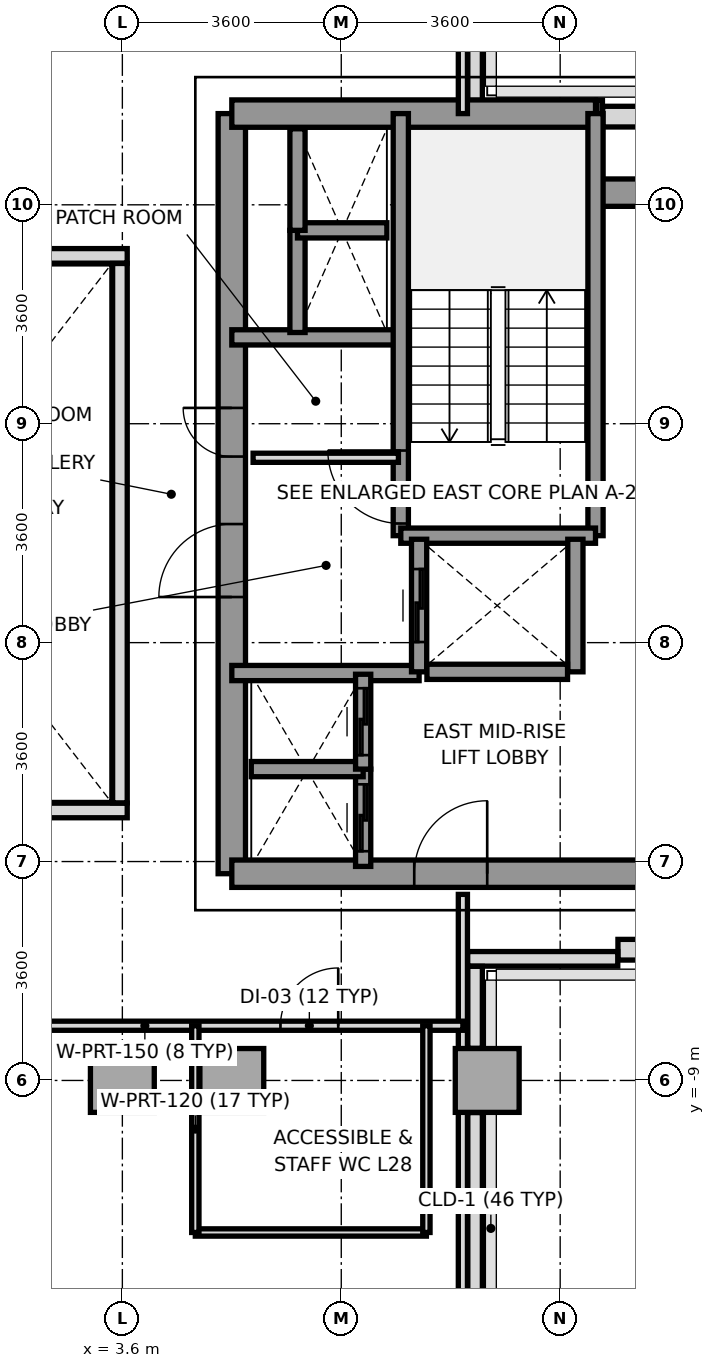
"""IFC4 building model, lengths in metres.
Left out: names, types, materials, properties, quantities, classifications, styles, units other than length and angle.
Written with IfcOpenShell. Run it as: python <this file> out.ifc"""

import sys

from ifc_helpers import new_model, si_unit, direction, frame, frame_2d, origin, origin_2d, place, context, subcontext, project, spatial, rectangle, extrude, source, transform, mapped, element, fill, save


model = new_model("IFC4")
c1 = context("Model", 3, precision=1e-05, world=origin(), true_north=direction((0.0, 1.0)))
c2 = subcontext(c1, "Body", "Model", "MODEL_VIEW")
j1 = project(units=[si_unit("LENGTHUNIT", "METRE"), si_unit("PLANEANGLEUNIT", "RADIAN")], contexts=[c1])
p1 = place(None, origin())
s1 = spatial("IfcSite", under=j1, at=p1, CompositionType="ELEMENT")
p2 = place(p1, origin())
s2 = spatial("IfcBuilding", under=s1, at=p2, CompositionType="ELEMENT")
p3 = place(p2, frame((0.0, 0.0, 107.4)))
s3 = spatial("IfcBuildingStorey", under=s2, at=p3, CompositionType="ELEMENT", Elevation=107.4)
m1 = source(origin(), c2, "Body", "SweptSolid", [
    extrude(rectangle(XDim=1.05, YDim=1.05, at=origin_2d()), origin(), (0.0, 0.0, 1.0), 3.2),
])
for number, where, z_axis, x_axis in (
    (1, (3.6, -9.0, 0.0), (0.0, 0.0, 1.0), (1.0, 0.0, 0.0)),
    (2, (5.4, -9.0, 0.0), (0.0, 0.0, 1.0), (1.0, 0.0, 0.0)),
    (3, (9.6, -9.0, 0.0), (0.0, 0.0, 1.0), (1.0, 0.0, 0.0)),
):
    element("IfcColumn", number, at=place(p3, frame(where, z_axis=z_axis, x_axis=x_axis)), inside=s3, PredefinedType="COLUMN", context=c2, shape_type="MappedRepresentation", body=[
        mapped(m1, transform((0.0, 0.0, 0.0), x_axis=(1.0, 0.0, 0.0), y_axis=(0.0, 1.0, 0.0), z_axis=(0.0, 0.0, 1.0), scale=1.0)),
    ])
p4 = place(p3, frame((11.498, 6.85, 0.0), z_axis=(0.0, 0.0, 1.0), x_axis=(1.0, 0.0, 0.0)))
e4 = element("IfcWall", 4, at=p4, inside=s3, PredefinedType="SOLIDWALL", context=c2, shape_type="SweptSolid", body=[
    extrude(rectangle(XDim=2.585, YDim=0.34, at=frame_2d((1.292, 0.0))), origin(), (0.0, 0.0, 1.0), 3.2),
])
p5 = place(p3, frame((11.75, -6.85, 0.0), z_axis=(0.0, 0.0, 1.0), x_axis=(1.0, 0.0, 0.0)))
e5 = element("IfcWall", 5, at=p5, inside=s3, PredefinedType="SOLIDWALL", context=c2, shape_type="SweptSolid", body=[
    extrude(rectangle(XDim=2.333, YDim=0.34, at=frame_2d((1.167, 0.0))), origin(), (0.0, 0.0, 1.0), 3.2),
])
p6 = place(p3, frame((11.747, -7.0, 0.0), z_axis=(0.0, 0.0, 1.0), x_axis=(-1.0, 0.0, 0.0)))
e6 = element("IfcWall", 6, at=p6, inside=s3, PredefinedType="PARAPET", context=c2, shape_type="SweptSolid", body=[
    extrude(rectangle(XDim=2.469, YDim=0.24, at=frame_2d((1.234, 0.0))), origin(), (0.0, 0.0, 1.0), 1.15),
])
p7 = place(p3, frame((9.4, -7.123, 0.0), z_axis=(0.0, 0.0, 1.0), x_axis=(0.0, -1.0, 0.0)))
e7 = element("IfcWall", 7, at=p7, inside=s3, PredefinedType="PARAPET", context=c2, shape_type="SweptSolid", body=[
    extrude(rectangle(XDim=1.349, YDim=0.24, at=frame_2d((0.674, 0.0))), origin(), (0.0, 0.0, 1.0), 1.15),
])
p8 = place(p3, frame((9.4, -9.528, 0.0), z_axis=(0.0, 0.0, 1.0), x_axis=(0.0, -1.0, 0.0)))
e8 = element("IfcWall", 8, at=p8, inside=s3, PredefinedType="PARAPET", context=c2, shape_type="SweptSolid", body=[
    extrude(rectangle(XDim=6.075, YDim=0.24, at=frame_2d((3.037, 0.0))), origin(), (0.0, 0.0, 1.0), 1.15),
])
p9 = place(p3, frame((9.4, 8.472, 0.0), z_axis=(0.0, 0.0, 1.0), x_axis=(0.0, -1.0, 0.0)))
e9 = element("IfcWall", 9, at=p9, inside=s3, PredefinedType="PARAPET", context=c2, shape_type="SweptSolid", body=[
    extrude(rectangle(XDim=1.519, YDim=0.24, at=frame_2d((0.76, 0.0))), origin(), (0.0, 0.0, 1.0), 1.15),
])
p10 = place(p3, frame((11.403, 7.0, 0.0), z_axis=(0.0, 0.0, 1.0), x_axis=(1.0, 0.0, 0.0)))
e10 = element("IfcWall", 10, at=p10, inside=s3, PredefinedType="PARAPET", context=c2, shape_type="SweptSolid", body=[
    extrude(rectangle(XDim=0.092, YDim=0.24, at=frame_2d((0.046, 0.0))), origin(), (0.0, 0.0, 1.0), 1.15),
])
p11 = place(p3, frame((5.4, -5.6, 0.0), z_axis=(0.0, 0.0, 1.0), x_axis=(0.0, 1.0, 0.0)))
e11 = element("IfcWall", 11, at=p11, inside=s3, PredefinedType="SHEAR", context=c2, shape_type="SweptSolid", body=[
    extrude(rectangle(XDim=12.5, YDim=0.45, at=frame_2d((6.25, 0.0))), origin(), (0.0, 0.0, 1.0), 3.2),
])
p12 = place(p11, frame((4.55, 0.0, 0.0)))
e12 = element("IfcOpeningElement", 12, at=p12, cuts=e11, PredefinedType="OPENING", context=c2, shape_type="SweptSolid", body=[
    extrude(rectangle(XDim=1.2, YDim=2.2, at=frame_2d((0.6, 1.1))), frame((0.0, 0.235, 0.0), z_axis=(0.0, -1.0, 0.0), x_axis=(1.0, 0.0, 0.0)), (0.0, 0.0, 1.0), 0.47),
])
p13 = place(p11, frame((6.86, 0.0, 0.0)))
e13 = element("IfcOpeningElement", 13, at=p13, cuts=e11, PredefinedType="OPENING", context=c2, shape_type="SweptSolid", body=[
    extrude(rectangle(XDim=0.8, YDim=2.1, at=frame_2d((0.4, 1.05))), frame((0.0, 0.235, 0.0), z_axis=(0.0, -1.0, 0.0), x_axis=(1.0, 0.0, 0.0)), (0.0, 0.0, 1.0), 0.47),
])
p14 = place(p3, frame((5.4, 6.9, 0.0), z_axis=(0.0, 0.0, 1.0), x_axis=(1.0, 0.0, 0.0)))
e14 = element("IfcWall", 14, at=p14, inside=s3, PredefinedType="SHEAR", context=c2, shape_type="SweptSolid", body=[
    extrude(rectangle(XDim=5.981, YDim=0.45, at=frame_2d((2.991, 0.0))), origin(), (0.0, 0.0, 1.0), 3.2),
])
p15 = place(p3, frame((11.381, 5.6, 0.0), z_axis=(0.0, 0.0, 1.0), x_axis=(1.0, 0.0, 0.0)))
e15 = element("IfcWall", 15, at=p15, inside=s3, PredefinedType="SHEAR", context=c2, shape_type="SweptSolid", body=[
    extrude(rectangle(XDim=1.819, YDim=0.45, at=frame_2d((0.909, 0.0))), origin(), (0.0, 0.0, 1.0), 3.2),
])
p16 = place(p3, frame((5.4, -5.6, 0.0), z_axis=(0.0, 0.0, 1.0), x_axis=(1.0, 0.0, 0.0)))
e16 = element("IfcWall", 16, at=p16, inside=s3, PredefinedType="SHEAR", context=c2, shape_type="SweptSolid", body=[
    extrude(rectangle(XDim=7.8, YDim=0.45, at=frame_2d((3.9, 0.0))), origin(), (0.0, 0.0, 1.0), 3.2),
])
p17 = place(p16, frame((3.0, 0.0, 0.0)))
e17 = element("IfcOpeningElement", 17, at=p17, cuts=e16, PredefinedType="OPENING", context=c2, shape_type="SweptSolid", body=[
    extrude(rectangle(XDim=1.2, YDim=2.2, at=frame_2d((0.6, 1.1))), frame((0.0, 0.235, 0.0), z_axis=(0.0, -1.0, 0.0), x_axis=(1.0, 0.0, 0.0)), (0.0, 0.0, 1.0), 0.47),
])
p18 = place(p3, frame((5.4, 3.22, 0.0), z_axis=(0.0, 0.0, 1.0), x_axis=(1.0, 0.0, 0.0)))
e18 = element("IfcWall", 18, at=p18, inside=s3, PredefinedType="SOLIDWALL", context=c2, shape_type="SweptSolid", body=[
    extrude(rectangle(XDim=2.78, YDim=0.25, at=frame_2d((1.39, 0.0))), origin(), (0.0, 0.0, 1.0), 3.2),
])
p19 = place(p3, frame((5.4, -2.3, 0.0), z_axis=(0.0, 0.0, 1.0), x_axis=(1.0, 0.0, 0.0)))
e19 = element("IfcWall", 19, at=p19, inside=s3, PredefinedType="SOLIDWALL", context=c2, shape_type="SweptSolid", body=[
    extrude(rectangle(XDim=3.08, YDim=0.25, at=frame_2d((1.54, 0.0))), origin(), (0.0, 0.0, 1.0), 3.2),
])
p20 = place(p3, frame((8.179, -0.041, 0.0), z_axis=(0.0, 0.0, 1.0), x_axis=(0.0, 1.0, 0.0)))
e20 = element("IfcWall", 20, at=p20, inside=s3, PredefinedType="SOLIDWALL", context=c2, shape_type="SweptSolid", body=[
    extrude(rectangle(XDim=6.941, YDim=0.25, at=frame_2d((3.47, 0.0))), origin(), (0.0, 0.0, 1.0), 3.2),
])
p21 = place(p20, frame((0.2, 0.0, 0.0)))
e21 = element("IfcOpeningElement", 21, at=p21, cuts=e20, PredefinedType="OPENING", context=c2, shape_type="SweptSolid", body=[
    extrude(rectangle(XDim=1.2, YDim=2.2, at=frame_2d((0.6, 1.1))), frame((0.0, 0.135, 0.0), z_axis=(0.0, -1.0, 0.0), x_axis=(1.0, 0.0, 0.0)), (0.0, 0.0, 1.0), 0.27),
])
p22 = place(p3, frame((11.381, -0.041, 0.0), z_axis=(0.0, 0.0, 1.0), x_axis=(0.0, 1.0, 0.0)))
e22 = element("IfcWall", 22, at=p22, inside=s3, PredefinedType="SOLIDWALL", context=c2, shape_type="SweptSolid", body=[
    extrude(rectangle(XDim=6.941, YDim=0.25, at=frame_2d((3.47, 0.0))), origin(), (0.0, 0.0, 1.0), 3.2),
])
p23 = place(p3, frame((8.179, -0.041, 0.0), z_axis=(0.0, 0.0, 1.0), x_axis=(1.0, 0.0, 0.0)))
e23 = element("IfcWall", 23, at=p23, inside=s3, PredefinedType="SOLIDWALL", context=c2, shape_type="SweptSolid", body=[
    extrude(rectangle(XDim=3.202, YDim=0.25, at=frame_2d((1.601, 0.0))), origin(), (0.0, 0.0, 1.0), 3.2),
])
p24 = place(p3, frame((8.48, -2.28, 0.0), z_axis=(0.0, 0.0, 1.0), x_axis=(0.0, 1.0, 0.0)))
e24 = element("IfcWall", 24, at=p24, inside=s3, PredefinedType="SOLIDWALL", context=c2, shape_type="SweptSolid", body=[
    extrude(rectangle(XDim=2.18, YDim=0.25, at=frame_2d((1.09, 0.0))), origin(), (0.0, 0.0, 1.0), 3.2),
])
p25 = place(p24, frame((0.49, 0.0, 0.0)))
e25 = element("IfcOpeningElement", 25, at=p25, cuts=e24, PredefinedType="OPENING", context=c2, shape_type="SweptSolid", body=[
    extrude(rectangle(XDim=1.2, YDim=2.2, at=frame_2d((0.6, 1.1))), frame((0.0, 0.135, 0.0), z_axis=(0.0, -1.0, 0.0), x_axis=(1.0, 0.0, 0.0)), (0.0, 0.0, 1.0), 0.27),
])
p26 = place(p3, frame((11.05, -2.28, 0.0), z_axis=(0.0, 0.0, 1.0), x_axis=(0.0, 1.0, 0.0)))
e26 = element("IfcWall", 26, at=p26, inside=s3, PredefinedType="SOLIDWALL", context=c2, shape_type="SweptSolid", body=[
    extrude(rectangle(XDim=2.18, YDim=0.25, at=frame_2d((1.09, 0.0))), origin(), (0.0, 0.0, 1.0), 3.2),
])
p27 = place(p3, frame((8.609, -2.28, 0.0), z_axis=(0.0, 0.0, 1.0), x_axis=(1.0, 0.0, 0.0)))
e27 = element("IfcWall", 27, at=p27, inside=s3, PredefinedType="SOLIDWALL", context=c2, shape_type="SweptSolid", body=[
    extrude(rectangle(XDim=2.312, YDim=0.25, at=frame_2d((1.156, 0.0))), origin(), (0.0, 0.0, 1.0), 3.2),
])
p28 = place(p3, frame((7.56, -5.48, 0.0), z_axis=(0.0, 0.0, 1.0), x_axis=(0.0, 1.0, 0.0)))
e28 = element("IfcWall", 28, at=p28, inside=s3, PredefinedType="SOLIDWALL", context=c2, shape_type="SweptSolid", body=[
    extrude(rectangle(XDim=1.6, YDim=0.25, at=frame_2d((0.8, 0.0))), origin(), (0.0, 0.0, 1.0), 3.2),
])
p29 = place(p28, frame((0.25, 0.0, 0.0)))
e29 = element("IfcOpeningElement", 29, at=p29, cuts=e28, PredefinedType="OPENING", context=c2, shape_type="SweptSolid", body=[
    extrude(rectangle(XDim=1.1, YDim=2.2, at=frame_2d((0.55, 1.1))), frame((0.0, 0.135, 0.0), z_axis=(0.0, -1.0, 0.0), x_axis=(1.0, 0.0, 0.0)), (0.0, 0.0, 1.0), 0.27),
])
p30 = place(p3, frame((5.72, -3.88, 0.0), z_axis=(0.0, 0.0, 1.0), x_axis=(1.0, 0.0, 0.0)))
e30 = element("IfcWall", 30, at=p30, inside=s3, PredefinedType="SOLIDWALL", context=c2, shape_type="SweptSolid", body=[
    extrude(rectangle(XDim=1.84, YDim=0.25, at=frame_2d((0.92, 0.0))), origin(), (0.0, 0.0, 1.0), 3.2),
])
p31 = place(p3, frame((7.56, -3.88, 0.0), z_axis=(0.0, 0.0, 1.0), x_axis=(0.0, 1.0, 0.0)))
e31 = element("IfcWall", 31, at=p31, inside=s3, PredefinedType="SOLIDWALL", context=c2, shape_type="SweptSolid", body=[
    extrude(rectangle(XDim=1.56, YDim=0.25, at=frame_2d((0.78, 0.0))), origin(), (0.0, 0.0, 1.0), 3.2),
])
p32 = place(p31, frame((0.23, 0.0, 0.0)))
e32 = element("IfcOpeningElement", 32, at=p32, cuts=e31, PredefinedType="OPENING", context=c2, shape_type="SweptSolid", body=[
    extrude(rectangle(XDim=1.1, YDim=2.2, at=frame_2d((0.55, 1.1))), frame((0.0, 0.135, 0.0), z_axis=(0.0, -1.0, 0.0), x_axis=(1.0, 0.0, 0.0)), (0.0, 0.0, 1.0), 0.27),
])
p33 = place(p3, frame((6.48, 3.3, 0.0), z_axis=(0.0, 0.0, 1.0), x_axis=(0.0, 1.0, 0.0)))
e33 = element("IfcWall", 33, at=p33, inside=s3, PredefinedType="SOLIDWALL", context=c2, shape_type="SweptSolid", body=[
    extrude(rectangle(XDim=1.68, YDim=0.25, at=frame_2d((0.84, 0.0))), origin(), (0.0, 0.0, 1.0), 3.2),
])
p34 = place(p3, frame((6.48, 4.98, 0.0), z_axis=(0.0, 0.0, 1.0), x_axis=(1.0, 0.0, 0.0)))
e34 = element("IfcWall", 34, at=p34, inside=s3, PredefinedType="SOLIDWALL", context=c2, shape_type="SweptSolid", body=[
    extrude(rectangle(XDim=1.47, YDim=0.25, at=frame_2d((0.735, 0.0))), origin(), (0.0, 0.0, 1.0), 3.2),
])
p35 = place(p3, frame((6.48, 4.98, 0.0), z_axis=(0.0, 0.0, 1.0), x_axis=(0.0, 1.0, 0.0)))
e35 = element("IfcWall", 35, at=p35, inside=s3, PredefinedType="SOLIDWALL", context=c2, shape_type="SweptSolid", body=[
    extrude(rectangle(XDim=1.67, YDim=0.25, at=frame_2d((0.835, 0.0))), origin(), (0.0, 0.0, 1.0), 3.2),
])
p36 = place(p3, frame((5.75, 1.24, 0.0), z_axis=(0.0, 0.0, 1.0), x_axis=(1.0, 0.0, 0.0)))
e36 = element("IfcWall", 36, at=p36, inside=s3, PredefinedType="PARTITIONING", context=c2, shape_type="SweptSolid", body=[
    extrude(rectangle(XDim=2.39, YDim=0.15, at=frame_2d((1.195, 0.0))), origin(), (0.0, 0.0, 1.0), 2.3),
])
p37 = place(p3, frame((9.2, 6.9, 0.0), z_axis=(0.0, 0.0, 1.0), x_axis=(0.0, 1.0, 0.0)))
e37 = element("IfcWall", 37, at=p37, inside=s3, PredefinedType="PARTITIONING", context=c2, shape_type="SweptSolid", body=[
    extrude(rectangle(XDim=8.78, YDim=0.15, at=frame_2d((4.39, 0.0))), origin(), (0.0, 0.0, 1.0), 2.7),
])
p38 = place(p3, frame((9.2, -15.68, 0.0), z_axis=(0.0, 0.0, 1.0), x_axis=(0.0, 1.0, 0.0)))
e38 = element("IfcWall", 38, at=p38, inside=s3, PredefinedType="PARTITIONING", context=c2, shape_type="SweptSolid", body=[
    extrude(rectangle(XDim=9.74, YDim=0.15, at=frame_2d((4.87, 0.0))), origin(), (0.0, 0.0, 1.0), 2.7),
])
p39 = place(p3, frame((-1.26, -8.1, 0.0), z_axis=(0.0, 0.0, 1.0), x_axis=(1.0, 0.0, 0.0)))
e39 = element("IfcWall", 39, at=p39, inside=s3, PredefinedType="PARTITIONING", context=c2, shape_type="SweptSolid", body=[
    extrude(rectangle(XDim=10.46, YDim=0.15, at=frame_2d((5.23, 0.0))), origin(), (0.0, 0.0, 1.0), 2.75),
])
p40 = place(p39, frame((7.46, 0.0, 0.0)))
e40 = element("IfcOpeningElement", 40, at=p40, cuts=e39, PredefinedType="OPENING", context=c2, shape_type="SweptSolid", body=[
    extrude(rectangle(XDim=0.95, YDim=2.15, at=frame_2d((0.475, 1.075))), frame((0.0, 0.085, 0.0), z_axis=(0.0, -1.0, 0.0), x_axis=(1.0, 0.0, 0.0)), (0.0, 0.0, 1.0), 0.17),
])
p41 = place(p3, frame((4.8, -11.5, 0.0), z_axis=(0.0, 0.0, 1.0), x_axis=(1.0, 0.0, 0.0)))
e41 = element("IfcWall", 41, at=p41, inside=s3, PredefinedType="PARTITIONING", context=c2, shape_type="SweptSolid", body=[
    extrude(rectangle(XDim=3.8, YDim=0.12, at=frame_2d((1.9, 0.0))), origin(), (0.0, 0.0, 1.0), 3.2),
])
p42 = place(p3, frame((4.8, -11.5, 0.0), z_axis=(0.0, 0.0, 1.0), x_axis=(0.0, 1.0, 0.0)))
e42 = element("IfcWall", 42, at=p42, inside=s3, PredefinedType="PARTITIONING", context=c2, shape_type="SweptSolid", body=[
    extrude(rectangle(XDim=3.4, YDim=0.12, at=frame_2d((1.7, 0.0))), origin(), (0.0, 0.0, 1.0), 3.2),
])
p43 = place(p3, frame((8.6, -11.5, 0.0), z_axis=(0.0, 0.0, 1.0), x_axis=(0.0, 1.0, 0.0)))
e43 = element("IfcWall", 43, at=p43, inside=s3, PredefinedType="PARTITIONING", context=c2, shape_type="SweptSolid", body=[
    extrude(rectangle(XDim=3.4, YDim=0.12, at=frame_2d((1.7, 0.0))), origin(), (0.0, 0.0, 1.0), 2.7),
])
for number, where, z_axis, x_axis in (
    (44, (-3.68, -4.56, 0.0), (0.0, 0.0, 1.0), (1.0, 0.0, 0.0)),
    (45, (-3.68, 4.56, 0.0), (0.0, 0.0, 1.0), (1.0, 0.0, 0.0)),
):
    element("IfcWall", number, at=place(p3, frame(where, z_axis=z_axis, x_axis=x_axis)), inside=s3, PredefinedType="PARAPET", context=c2, shape_type="SweptSolid", body=[
        extrude(rectangle(XDim=7.36, YDim=0.24, at=frame_2d((3.68, 0.0))), origin(), (0.0, 0.0, 1.0), 1.15),
    ])
p44 = place(p3, frame((3.56, -4.435, 0.0), z_axis=(0.0, 0.0, 1.0), x_axis=(0.0, 1.0, 0.0)))
e46 = element("IfcWall", 46, at=p44, inside=s3, PredefinedType="PARAPET", context=c2, shape_type="SweptSolid", body=[
    extrude(rectangle(XDim=8.87, YDim=0.24, at=frame_2d((4.435, 0.0))), origin(), (0.0, 0.0, 1.0), 1.15),
])
m2 = source(origin(), c2, "Body", "SweptSolid", [
    extrude(rectangle(XDim=1.2, YDim=2.2, at=frame_2d((0.6, 1.1))), frame((0.0, 0.025, 0.0), z_axis=(0.0, -1.0, 0.0), x_axis=(1.0, 0.0, 0.0)), (0.0, 0.0, 1.0), 0.05),
])
p45 = place(p21, origin())
e47 = element("IfcDoor", 47, at=p45, inside=s3, OperationType="SINGLE_SWING_RIGHT", PredefinedType="DOOR", context=c2, shape_type="MappedRepresentation", body=[
    mapped(m2, transform((0.0, 0.0, 0.0), x_axis=(1.0, 0.0, 0.0), y_axis=(0.0, 1.0, 0.0), z_axis=(0.0, 0.0, 1.0), scale=1.0)),
])
fill(e21, e47)
p46 = place(p12, origin())
e48 = element("IfcDoor", 48, at=p46, inside=s3, OperationType="SINGLE_SWING_LEFT", PredefinedType="DOOR", context=c2, shape_type="MappedRepresentation", body=[
    mapped(m2, transform((0.0, 0.0, 0.0), x_axis=(1.0, 0.0, 0.0), y_axis=(0.0, 1.0, 0.0), z_axis=(0.0, 0.0, 1.0), scale=1.0)),
])
fill(e12, e48)
p47 = place(p17, origin())
e49 = element("IfcDoor", 49, at=p47, inside=s3, OperationType="SINGLE_SWING_RIGHT", PredefinedType="DOOR", context=c2, shape_type="MappedRepresentation", body=[
    mapped(m2, transform((0.0, 0.0, 0.0), x_axis=(1.0, 0.0, 0.0), y_axis=(0.0, 1.0, 0.0), z_axis=(0.0, 0.0, 1.0), scale=1.0)),
])
fill(e17, e49)
m3 = source(origin(), c2, "Body", "SweptSolid", [
    extrude(rectangle(XDim=0.8, YDim=2.1, at=frame_2d((0.4, 1.05))), frame((0.0, 0.025, 0.0), z_axis=(0.0, -1.0, 0.0), x_axis=(1.0, 0.0, 0.0)), (0.0, 0.0, 1.0), 0.05),
])
p48 = place(p13, origin())
e50 = element("IfcDoor", 50, at=p48, inside=s3, OperationType="SINGLE_SWING_RIGHT", PredefinedType="DOOR", context=c2, shape_type="MappedRepresentation", body=[
    mapped(m3, transform((0.0, 0.0, 0.0), x_axis=(1.0, 0.0, 0.0), y_axis=(0.0, 1.0, 0.0), z_axis=(0.0, 0.0, 1.0), scale=1.0)),
])
fill(e13, e50)
p49 = place(p25, origin())
e51 = element("IfcDoor", 51, at=p49, inside=s3, OperationType="SLIDING_TO_RIGHT", PredefinedType="DOOR", context=c2, shape_type="MappedRepresentation", body=[
    mapped(m2, transform((0.0, 0.0, 0.0), x_axis=(1.0, 0.0, 0.0), y_axis=(0.0, 1.0, 0.0), z_axis=(0.0, 0.0, 1.0), scale=1.0)),
])
fill(e25, e51)
m4 = source(origin(), c2, "Body", "SweptSolid", [
    extrude(rectangle(XDim=1.1, YDim=2.2, at=frame_2d((0.55, 1.1))), frame((0.0, 0.025, 0.0), z_axis=(0.0, -1.0, 0.0), x_axis=(1.0, 0.0, 0.0)), (0.0, 0.0, 1.0), 0.05),
])
p50 = place(p29, origin())
e52 = element("IfcDoor", 52, at=p50, inside=s3, OperationType="SLIDING_TO_LEFT", PredefinedType="DOOR", context=c2, shape_type="MappedRepresentation", body=[
    mapped(m4, transform((0.0, 0.0, 0.0), x_axis=(1.0, 0.0, 0.0), y_axis=(0.0, 1.0, 0.0), z_axis=(0.0, 0.0, 1.0), scale=1.0)),
])
fill(e29, e52)
p51 = place(p32, origin())
e53 = element("IfcDoor", 53, at=p51, inside=s3, OperationType="SLIDING_TO_LEFT", PredefinedType="DOOR", context=c2, shape_type="MappedRepresentation", body=[
    mapped(m4, transform((0.0, 0.0, 0.0), x_axis=(1.0, 0.0, 0.0), y_axis=(0.0, 1.0, 0.0), z_axis=(0.0, 0.0, 1.0), scale=1.0)),
])
fill(e32, e53)
m5 = source(origin(), c2, "Body", "SweptSolid", [
    extrude(rectangle(XDim=0.95, YDim=2.15, at=frame_2d((0.475, 1.075))), frame((0.0, 0.025, 0.0), z_axis=(0.0, -1.0, 0.0), x_axis=(1.0, 0.0, 0.0)), (0.0, 0.0, 1.0), 0.05),
])
p52 = place(p40, origin())
e54 = element("IfcDoor", 54, at=p52, inside=s3, OperationType="SINGLE_SWING_RIGHT", PredefinedType="DOOR", context=c2, shape_type="MappedRepresentation", body=[
    mapped(m5, transform((0.0, 0.0, 0.0), x_axis=(1.0, 0.0, 0.0), y_axis=(0.0, 1.0, 0.0), z_axis=(0.0, 0.0, 1.0), scale=1.0)),
])
fill(e40, e54)
save(model, sys.argv[1])
